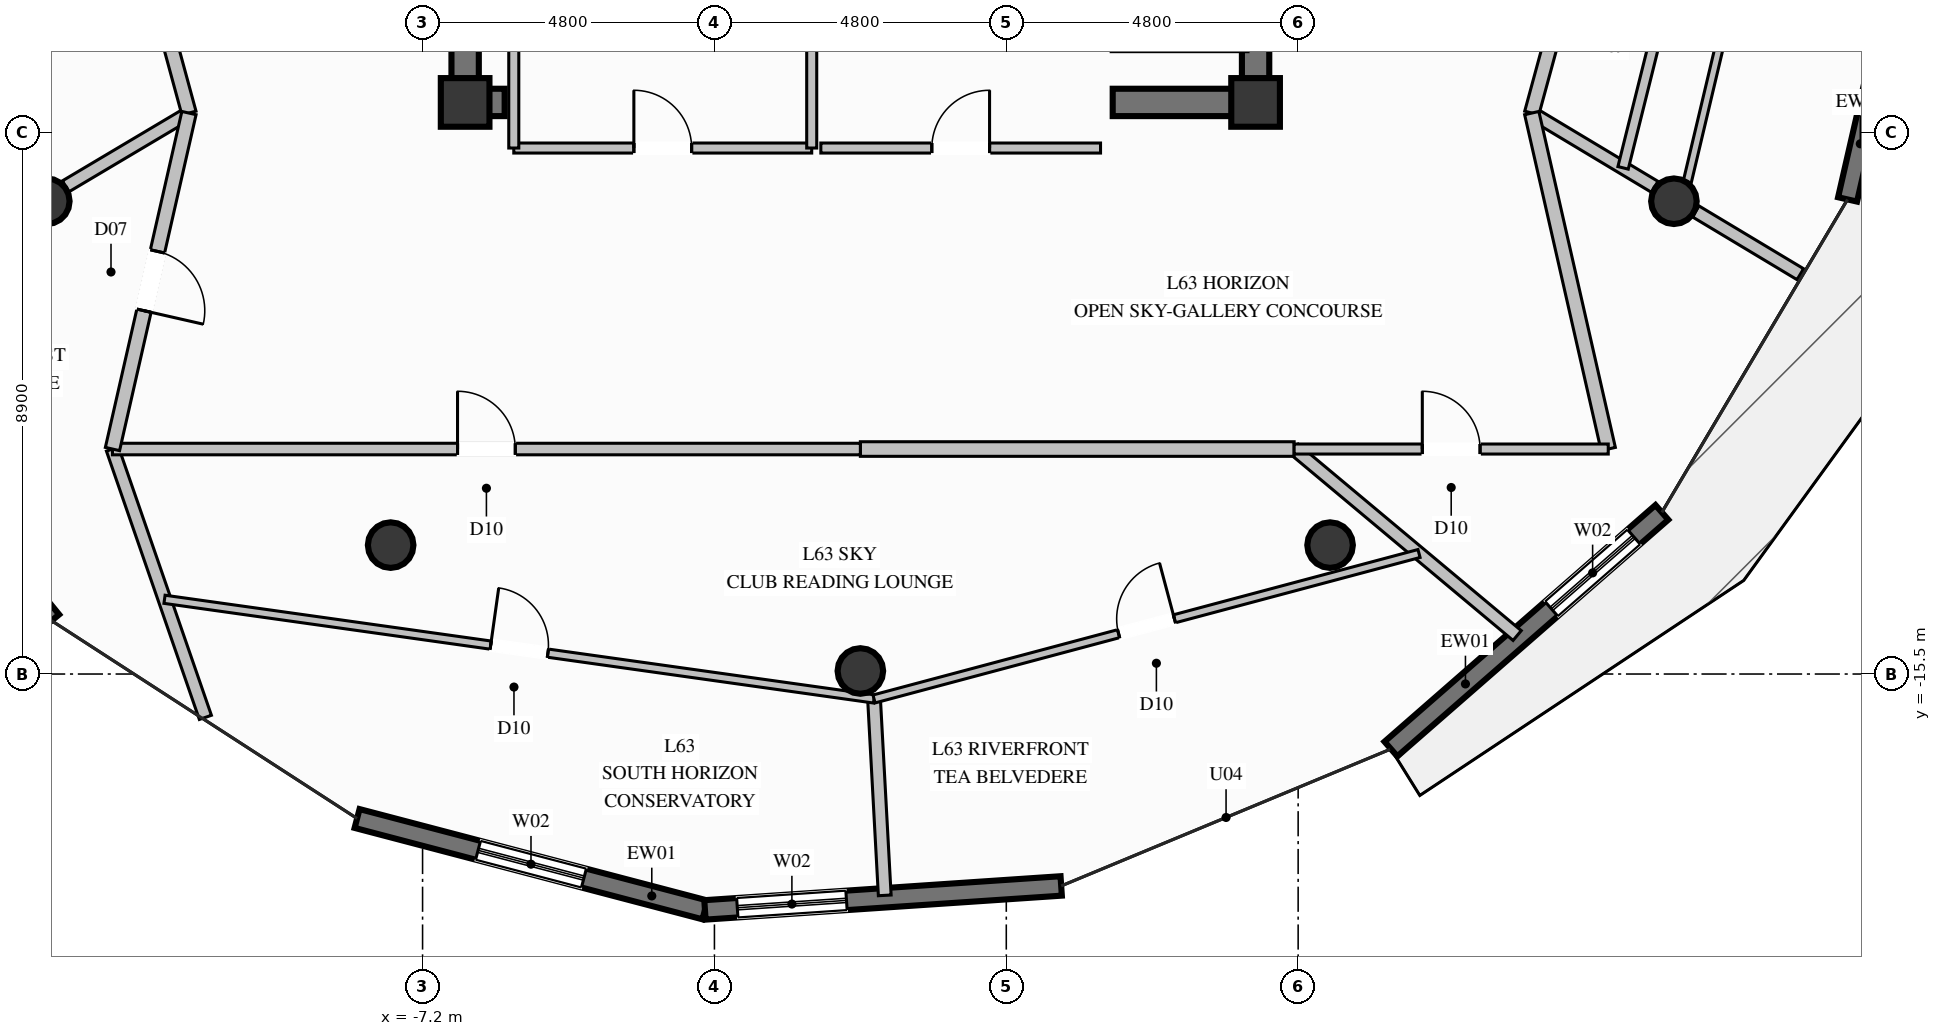
"""IFC4 building model, lengths in metres.
Left out: names, types, materials, properties, quantities, classifications, styles, units other than length and angle.
Written with IfcOpenShell. Run it as: python <this file> out.ifc"""

import sys

from ifc_helpers import new_model, si_unit, direction, frame, frame_2d, origin, origin_2d, place, context, subcontext, project, spatial, rectangle, circle, extrude, element, fill, save


model = new_model("IFC4")
c1 = context("Model", 3, precision=1e-05, world=origin(), true_north=direction((0.0, 1.0)))
c2 = subcontext(c1, "Body", "Model", "MODEL_VIEW")
j1 = project(units=[si_unit("LENGTHUNIT", "METRE"), si_unit("PLANEANGLEUNIT", "RADIAN")], contexts=[c1])
p1 = place(None, origin())
s1 = spatial("IfcSite", under=j1, at=p1, CompositionType="ELEMENT")
p2 = place(p1, origin())
s2 = spatial("IfcBuilding", under=s1, at=p2, CompositionType="ELEMENT")
p3 = place(p2, frame((0.0, 0.0, 243.0)))
s3 = spatial("IfcBuildingStorey", under=s2, at=p3, CompositionType="ELEMENT", Elevation=243.0)
for number, where, z_axis, x_axis in (
    (1, (-6.5, -6.1, 0.0), (0.0, 0.0, 1.0), (1.0, 0.0, 0.0)),
    (2, (6.5, -6.1, 0.0), (0.0, 0.0, 1.0), (1.0, 0.0, 0.0)),
):
    element("IfcColumn", number, at=place(p3, frame(where, z_axis=z_axis, x_axis=x_axis)), inside=s3, PredefinedType="COLUMN", context=c2, shape_type="SweptSolid", body=[
        extrude(rectangle(XDim=0.8, YDim=0.8, at=origin_2d()), origin(), (0.0, 0.0, 1.0), 3.8),
    ])
p4 = place(p3, frame((-6.275, -6.1, 0.0), z_axis=(0.0, 0.0, 1.0), x_axis=(1.0, 0.0, 0.0)))
e3 = element("IfcWall", 3, at=p4, inside=s3, PredefinedType="SHEAR", context=c2, shape_type="SweptSolid", body=[
    extrude(rectangle(XDim=0.425, YDim=0.45, at=frame_2d((0.212, 0.0))), origin(), (0.0, 0.0, 1.0), 3.8),
])
p5 = place(p3, frame((4.15, -6.1, 0.0), z_axis=(0.0, 0.0, 1.0), x_axis=(1.0, 0.0, 0.0)))
e4 = element("IfcWall", 4, at=p5, inside=s3, PredefinedType="SHEAR", context=c2, shape_type="SweptSolid", body=[
    extrude(rectangle(XDim=2.125, YDim=0.45, at=frame_2d((1.062, 0.0))), origin(), (0.0, 0.0, 1.0), 3.8),
])
p6 = place(p3, frame((-6.5, -6.325, 0.0), z_axis=(0.0, 0.0, 1.0), x_axis=(0.0, 1.0, 0.0)))
e5 = element("IfcWall", 5, at=p6, inside=s3, PredefinedType="SHEAR", context=c2, shape_type="SweptSolid", body=[
    extrude(rectangle(XDim=2.975, YDim=0.45, at=frame_2d((1.487, 0.0))), origin(), (0.0, 0.0, 1.0), 3.8),
])
p7 = place(p3, frame((6.5, -6.325, 0.0), z_axis=(0.0, 0.0, 1.0), x_axis=(0.0, 1.0, 0.0)))
e6 = element("IfcWall", 6, at=p7, inside=s3, PredefinedType="SHEAR", context=c2, shape_type="SweptSolid", body=[
    extrude(rectangle(XDim=3.975, YDim=0.45, at=frame_2d((1.987, 0.0))), origin(), (0.0, 0.0, 1.0), 3.8),
])
for number, where, z_axis, x_axis in (
    (7, (-13.38, -7.725, 0.0), (0.0, 0.0, 1.0), (1.0, 0.0, 0.0)),
    (8, (-7.725, -13.38, 0.0), (0.0, 0.0, 1.0), (1.0, 0.0, 0.0)),
    (9, (0.0, -15.45, 0.0), (0.0, 0.0, 1.0), (1.0, 0.0, 0.0)),
    (10, (7.725, -13.38, 0.0), (0.0, 0.0, 1.0), (1.0, 0.0, 0.0)),
    (11, (13.38, -7.725, 0.0), (0.0, 0.0, 1.0), (1.0, 0.0, 0.0)),
):
    element("IfcColumn", number, at=place(p3, frame(where, z_axis=z_axis, x_axis=x_axis)), inside=s3, PredefinedType="COLUMN", context=c2, shape_type="SweptSolid", body=[
        extrude(circle(Radius=0.375, at=origin_2d()), origin(), (0.0, 0.0, 1.0), 3.8),
    ])
p8 = place(p3, frame((13.182, -12.842, 0.0), z_axis=(0.0, 0.0, 1.0), x_axis=(-0.753243589512, -0.657741662706, 0.0)))
e12 = element("IfcWall", 12, at=p8, inside=s3, PredefinedType="SOLIDWALL", context=c2, shape_type="SweptSolid", body=[
    extrude(rectangle(XDim=5.916, YDim=0.32, at=frame_2d((2.958, 0.0))), origin(), (0.0, 0.0, 1.0), 3.57),
])
p9 = place(p8, frame((0.612, 0.0, 0.35)))
e13 = element("IfcOpeningElement", 13, at=p9, cuts=e12, PredefinedType="OPENING", context=c2, shape_type="SweptSolid", body=[
    extrude(rectangle(XDim=1.8, YDim=2.6, at=frame_2d((0.9, 1.3))), frame((0.0, 0.17, 0.0), z_axis=(0.0, -1.0, 0.0), x_axis=(1.0, 0.0, 0.0)), (0.0, 0.0, 1.0), 0.34),
])
p10 = place(p3, frame((17.587, -1.795, 0.0), z_axis=(0.0, 0.0, 1.0), x_axis=(-0.223174159959, -0.974778587335, 0.0)))
e14 = element("IfcWall", 14, at=p10, inside=s3, PredefinedType="SOLIDWALL", context=c2, shape_type="SweptSolid", body=[
    extrude(rectangle(XDim=6.053, YDim=0.32, at=frame_2d((3.026, 0.0))), origin(), (0.0, 0.0, 1.0), 3.57),
])
p11 = place(p10, frame((2.126, 0.0, 0.35)))
e15 = element("IfcOpeningElement", 15, at=p11, cuts=e14, PredefinedType="OPENING", context=c2, shape_type="SweptSolid", body=[
    extrude(rectangle(XDim=1.8, YDim=2.6, at=frame_2d((0.9, 1.3))), frame((0.0, 0.17, 0.0), z_axis=(0.0, -1.0, 0.0), x_axis=(1.0, 0.0, 0.0)), (0.0, 0.0, 1.0), 0.34),
])
p12 = place(p3, frame((-13.301, -14.623, 0.0), z_axis=(0.0, 0.0, 1.0), x_axis=(-0.633391522875, 0.773831492478, 0.0)))
e16 = element("IfcWall", 16, at=p12, inside=s3, PredefinedType="SOLIDWALL", context=c2, shape_type="SweptSolid", body=[
    extrude(rectangle(XDim=6.053, YDim=0.32, at=frame_2d((3.027, 0.0))), origin(), (0.0, 0.0, 1.0), 3.57),
])
p13 = place(p12, frame((2.092, 0.0, 0.35)))
e17 = element("IfcOpeningElement", 17, at=p13, cuts=e16, PredefinedType="OPENING", context=c2, shape_type="SweptSolid", body=[
    extrude(rectangle(XDim=1.8, YDim=2.6, at=frame_2d((0.9, 1.3))), frame((0.0, 0.17, 0.0), z_axis=(0.0, -1.0, 0.0), x_axis=(1.0, 0.0, 0.0)), (0.0, 0.0, 1.0), 0.34),
])
p14 = place(p3, frame((-2.556, -19.379, 0.0), z_axis=(0.0, 0.0, 1.0), x_axis=(-0.96718457854, 0.254074774494, 0.0)))
e18 = element("IfcWall", 18, at=p14, inside=s3, PredefinedType="SOLIDWALL", context=c2, shape_type="SweptSolid", body=[
    extrude(rectangle(XDim=5.915, YDim=0.32, at=frame_2d((2.958, 0.0))), origin(), (0.0, 0.0, 1.0), 3.57),
])
p15 = place(p14, frame((2.058, 0.0, 0.35)))
e19 = element("IfcOpeningElement", 19, at=p15, cuts=e18, PredefinedType="OPENING", context=c2, shape_type="SweptSolid", body=[
    extrude(rectangle(XDim=1.8, YDim=2.6, at=frame_2d((0.9, 1.3))), frame((0.0, 0.17, 0.0), z_axis=(0.0, -1.0, 0.0), x_axis=(1.0, 0.0, 0.0)), (0.0, 0.0, 1.0), 0.34),
])
p16 = place(p3, frame((3.303, -18.985, 0.0), z_axis=(0.0, 0.0, 1.0), x_axis=(-0.997748768453, -0.067062620365, 0.0)))
e20 = element("IfcWall", 20, at=p16, inside=s3, PredefinedType="SOLIDWALL", context=c2, shape_type="SweptSolid", body=[
    extrude(rectangle(XDim=5.872, YDim=0.32, at=frame_2d((2.936, 0.0))), origin(), (0.0, 0.0, 1.0), 3.57),
])
p17 = place(p16, frame((3.539, 0.0, 0.35)))
e21 = element("IfcOpeningElement", 21, at=p17, cuts=e20, PredefinedType="OPENING", context=c2, shape_type="SweptSolid", body=[
    extrude(rectangle(XDim=1.8, YDim=2.6, at=frame_2d((0.9, 1.3))), frame((0.0, 0.17, 0.0), z_axis=(0.0, -1.0, 0.0), x_axis=(1.0, 0.0, 0.0)), (0.0, 0.0, 1.0), 0.34),
])
p18 = place(p3, frame((-5.7, -6.85, 0.0), z_axis=(0.0, 0.0, 1.0), x_axis=(1.0, 0.0, 0.0)))
e22 = element("IfcWall", 22, at=p18, inside=s3, PredefinedType="PARTITIONING", context=c2, shape_type="SweptSolid", body=[
    extrude(rectangle(XDim=4.9, YDim=0.165, at=frame_2d((2.45, 0.0))), origin(), (0.0, 0.0, 1.0), 2.655),
])
p19 = place(p18, frame((1.975, 0.0, 0.0)))
e23 = element("IfcOpeningElement", 23, at=p19, cuts=e22, PredefinedType="OPENING", context=c2, shape_type="SweptSolid", body=[
    extrude(rectangle(XDim=0.95, YDim=2.1, at=frame_2d((0.475, 1.05))), frame((0.0, 0.093, 0.0), z_axis=(0.0, -1.0, 0.0), x_axis=(1.0, 0.0, 0.0)), (0.0, 0.0, 1.0), 0.185),
])
p20 = place(p3, frame((-0.8, -6.85, 0.0), z_axis=(0.0, 0.0, 1.0), x_axis=(0.0, 1.0, 0.0)))
e24 = element("IfcWall", 24, at=p20, inside=s3, PredefinedType="PARTITIONING", context=c2, shape_type="SweptSolid", body=[
    extrude(rectangle(XDim=3.35, YDim=0.165, at=frame_2d((1.675, 0.0))), origin(), (0.0, 0.0, 1.0), 3.57),
])
p21 = place(p3, frame((-5.7, -3.5, 0.0), z_axis=(0.0, 0.0, 1.0), x_axis=(0.0, -1.0, 0.0)))
e25 = element("IfcWall", 25, at=p21, inside=s3, PredefinedType="PARTITIONING", context=c2, shape_type="SweptSolid", body=[
    extrude(rectangle(XDim=3.35, YDim=0.165, at=frame_2d((1.675, 0.0))), origin(), (0.0, 0.0, 1.0), 2.655),
])
p22 = place(p3, frame((-0.65, -6.85, 0.0), z_axis=(0.0, 0.0, 1.0), x_axis=(1.0, 0.0, 0.0)))
e26 = element("IfcWall", 26, at=p22, inside=s3, PredefinedType="PARTITIONING", context=c2, shape_type="SweptSolid", body=[
    extrude(rectangle(XDim=4.6, YDim=0.165, at=frame_2d((2.3, 0.0))), origin(), (0.0, 0.0, 1.0), 2.655),
])
p23 = place(p22, frame((1.825, 0.0, 0.0)))
e27 = element("IfcOpeningElement", 27, at=p23, cuts=e26, PredefinedType="OPENING", context=c2, shape_type="SweptSolid", body=[
    extrude(rectangle(XDim=0.95, YDim=2.1, at=frame_2d((0.475, 1.05))), frame((0.0, 0.093, 0.0), z_axis=(0.0, -1.0, 0.0), x_axis=(1.0, 0.0, 0.0)), (0.0, 0.0, 1.0), 0.185),
])
p24 = place(p3, frame((-11.042, -6.275, 0.0), z_axis=(0.0, 0.0, 1.0), x_axis=(-0.859685751386, -0.510823265781, 0.0)))
e28 = element("IfcWall", 28, at=p24, inside=s3, PredefinedType="PARTITIONING", context=c2, shape_type="SweptSolid", body=[
    extrude(rectangle(XDim=2.359, YDim=0.21, at=frame_2d((1.18, 0.0))), origin(), (0.0, 0.0, 1.0), 3.086),
])
p25 = place(p3, frame((11.042, -6.275, 0.0), z_axis=(0.0, 0.0, 1.0), x_axis=(0.857502061287, -0.514480529164, 0.0)))
e29 = element("IfcWall", 29, at=p25, inside=s3, PredefinedType="PARTITIONING", context=c2, shape_type="SweptSolid", body=[
    extrude(rectangle(XDim=2.358, YDim=0.21, at=frame_2d((1.179, 0.0))), origin(), (0.0, 0.0, 1.0), 3.086),
])
p26 = place(p3, frame((13.738, -7.892, 0.0), z_axis=(0.0, 0.0, 1.0), x_axis=(0.857407053578, -0.514638848587, 0.0)))
e30 = element("IfcWall", 30, at=p26, inside=s3, PredefinedType="PARTITIONING", context=c2, shape_type="SweptSolid", body=[
    extrude(rectangle(XDim=2.007, YDim=0.21, at=frame_2d((1.003, 0.0))), origin(), (0.0, 0.0, 1.0), 3.57),
])
p27 = place(p3, frame((-12.75, 0.0, 0.0), z_axis=(0.0, 0.0, 1.0), x_axis=(0.262640884433, -0.964893655189, 0.0)))
e31 = element("IfcWall", 31, at=p27, inside=s3, PredefinedType="PARTITIONING", context=c2, shape_type="SweptSolid", body=[
    extrude(rectangle(XDim=6.503, YDim=0.24, at=frame_2d((3.251, 0.0))), origin(), (0.0, 0.0, 1.0), 3.57),
])
p28 = place(p3, frame((11.042, -6.275, 0.0), z_axis=(0.0, 0.0, 1.0), x_axis=(0.262572701387, 0.964912211803, 0.0)))
e32 = element("IfcWall", 32, at=p28, inside=s3, PredefinedType="PARTITIONING", context=c2, shape_type="SweptSolid", body=[
    extrude(rectangle(XDim=2.731, YDim=0.24, at=frame_2d((1.365, 0.0))), origin(), (0.0, 0.0, 1.0), 3.57),
])
p29 = place(p3, frame((12.544, -7.176, 0.0), z_axis=(0.0, 0.0, 1.0), x_axis=(0.241851063072, 0.970313384062, 0.0)))
e33 = element("IfcWall", 33, at=p29, inside=s3, PredefinedType="PLUMBINGWALL", context=c2, shape_type="SweptSolid", body=[
    extrude(rectangle(XDim=3.105, YDim=0.175, at=frame_2d((1.553, 0.0))), origin(), (0.0, 0.0, 1.0), 3.57),
])
p30 = place(p3, frame((13.516, -7.759, 0.0), z_axis=(0.0, 0.0, 1.0), x_axis=(0.230840940032, 0.972991500685, 0.0)))
e34 = element("IfcWall", 34, at=p30, inside=s3, PredefinedType="PARTITIONING", context=c2, shape_type="SweptSolid", body=[
    extrude(rectangle(XDim=7.974, YDim=0.135, at=frame_2d((3.987, 0.0))), origin(), (0.0, 0.0, 1.0), 3.139),
])
p31 = place(p30, frame((3.512, 0.0, 0.0)))
e35 = element("IfcOpeningElement", 35, at=p31, cuts=e34, PredefinedType="OPENING", context=c2, shape_type="SweptSolid", body=[
    extrude(rectangle(XDim=0.95, YDim=2.1, at=frame_2d((0.475, 1.05))), frame((0.0, 0.078, 0.0), z_axis=(0.0, -1.0, 0.0), x_axis=(1.0, 0.0, 0.0)), (0.0, 0.0, 1.0), 0.155),
])
p32 = place(p3, frame((7.134, -11.8, 0.0), z_axis=(0.0, 0.0, 1.0), x_axis=(0.767165499913, -0.641449215249, 0.0)))
e36 = element("IfcWall", 36, at=p32, inside=s3, PredefinedType="PARTITIONING", context=c2, shape_type="SweptSolid", body=[
    extrude(rectangle(XDim=4.781, YDim=0.21, at=frame_2d((2.391, 0.0))), origin(), (0.0, 0.0, 1.0), 3.57),
])
p33 = place(p3, frame((-12.3, -11.8, 0.0), z_axis=(0.0, 0.0, 1.0), x_axis=(0.327216501768, -0.944949395984, 0.0)))
e37 = element("IfcWall", 37, at=p33, inside=s3, PredefinedType="PARTITIONING", context=c2, shape_type="SweptSolid", body=[
    extrude(rectangle(XDim=4.67, YDim=0.21, at=frame_2d((2.335, 0.0))), origin(), (0.0, 0.0, 1.0), 3.57),
])
p34 = place(p3, frame((0.0, -11.8, 0.0), z_axis=(0.0, 0.0, 1.0), x_axis=(1.0, 0.0, 0.0)))
e38 = element("IfcWall", 38, at=p34, inside=s3, PredefinedType="PARTITIONING", context=c2, shape_type="SweptSolid", body=[
    extrude(rectangle(XDim=7.134, YDim=0.24, at=frame_2d((3.567, 0.0))), origin(), (0.0, 0.0, 1.0), 3.57),
])
p35 = place(p3, frame((-12.3, -11.8, 0.0), z_axis=(0.0, 0.0, 1.0), x_axis=(1.0, 0.0, 0.0)))
e39 = element("IfcWall", 39, at=p35, inside=s3, PredefinedType="PARTITIONING", context=c2, shape_type="SweptSolid", body=[
    extrude(rectangle(XDim=12.3, YDim=0.19, at=frame_2d((6.15, 0.0))), origin(), (0.0, 0.0, 1.0), 3.57),
])
p36 = place(p35, frame((5.675, 0.0, 0.0)))
e40 = element("IfcOpeningElement", 40, at=p36, cuts=e39, PredefinedType="OPENING", context=c2, shape_type="SweptSolid", body=[
    extrude(rectangle(XDim=0.95, YDim=2.1, at=frame_2d((0.475, 1.05))), frame((0.0, 0.105, 0.0), z_axis=(0.0, -1.0, 0.0), x_axis=(1.0, 0.0, 0.0)), (0.0, 0.0, 1.0), 0.21),
])
p37 = place(p3, frame((-11.042, -6.275, 0.0), z_axis=(0.0, 0.0, 1.0), x_axis=(-0.222014008723, -0.975043475918, 0.0)))
e41 = element("IfcWall", 41, at=p37, inside=s3, PredefinedType="PARTITIONING", context=c2, shape_type="SweptSolid", body=[
    extrude(rectangle(XDim=5.667, YDim=0.24, at=frame_2d((2.833, 0.0))), origin(), (0.0, 0.0, 1.0), 3.57),
])
p38 = place(p37, frame((2.333, 0.0, 0.0)))
e42 = element("IfcOpeningElement", 42, at=p38, cuts=e41, PredefinedType="OPENING", context=c2, shape_type="SweptSolid", body=[
    extrude(rectangle(XDim=1.0, YDim=2.2, at=frame_2d((0.5, 1.1))), frame((0.0, 0.13, 0.0), z_axis=(0.0, -1.0, 0.0), x_axis=(1.0, 0.0, 0.0)), (0.0, 0.0, 1.0), 0.26),
])
p39 = place(p3, frame((0.225, -15.91, 0.0), z_axis=(0.0, 0.0, 1.0), x_axis=(0.054341356021, -0.998522416887, 0.0)))
e43 = element("IfcWall", 43, at=p39, inside=s3, PredefinedType="PARTITIONING", context=c2, shape_type="SweptSolid", body=[
    extrude(rectangle(XDim=3.235, YDim=0.21, at=frame_2d((1.617, 0.0))), origin(), (0.0, 0.0, 1.0), 3.57),
])
p40 = place(p3, frame((-11.444, -14.271, 0.0), z_axis=(0.0, 0.0, 1.0), x_axis=(0.990280714827, -0.139083089705, 0.0)))
e44 = element("IfcWall", 44, at=p40, inside=s3, PredefinedType="PARTITIONING", context=c2, shape_type="SweptSolid", body=[
    extrude(rectangle(XDim=11.784, YDim=0.135, at=frame_2d((5.892, 0.0))), origin(), (0.0, 0.0, 1.0), 3.139),
])
p41 = place(p40, frame((5.417, 0.0, 0.0)))
e45 = element("IfcOpeningElement", 45, at=p41, cuts=e44, PredefinedType="OPENING", context=c2, shape_type="SweptSolid", body=[
    extrude(rectangle(XDim=0.95, YDim=2.1, at=frame_2d((0.475, 1.05))), frame((0.0, 0.078, 0.0), z_axis=(0.0, -1.0, 0.0), x_axis=(1.0, 0.0, 0.0)), (0.0, 0.0, 1.0), 0.155),
])
p42 = place(p3, frame((0.225, -15.91, 0.0), z_axis=(0.0, 0.0, 1.0), x_axis=(0.966188184598, 0.25783791797, 0.0)))
e46 = element("IfcWall", 46, at=p42, inside=s3, PredefinedType="PARTITIONING", context=c2, shape_type="SweptSolid", body=[
    extrude(rectangle(XDim=9.277, YDim=0.135, at=frame_2d((4.638, 0.0))), origin(), (0.0, 0.0, 1.0), 3.139),
])
p43 = place(p42, frame((4.163, 0.0, 0.0)))
e47 = element("IfcOpeningElement", 47, at=p43, cuts=e46, PredefinedType="OPENING", context=c2, shape_type="SweptSolid", body=[
    extrude(rectangle(XDim=0.95, YDim=2.1, at=frame_2d((0.475, 1.05))), frame((0.0, 0.078, 0.0), z_axis=(0.0, -1.0, 0.0), x_axis=(1.0, 0.0, 0.0)), (0.0, 0.0, 1.0), 0.155),
])
p44 = place(p3, frame((12.3, -11.8, 0.0), z_axis=(0.0, 0.0, 1.0), x_axis=(-0.222014008723, 0.975043475918, 0.0)))
e48 = element("IfcWall", 48, at=p44, inside=s3, PredefinedType="PARTITIONING", context=c2, shape_type="SweptSolid", body=[
    extrude(rectangle(XDim=5.667, YDim=0.24, at=frame_2d((2.833, 0.0))), origin(), (0.0, 0.0, 1.0), 3.57),
])
p45 = place(p3, frame((7.134, -11.8, 0.0), z_axis=(0.0, 0.0, 1.0), x_axis=(1.0, 0.0, 0.0)))
e49 = element("IfcWall", 49, at=p45, inside=s3, PredefinedType="PARTITIONING", context=c2, shape_type="SweptSolid", body=[
    extrude(rectangle(XDim=5.166, YDim=0.165, at=frame_2d((2.583, 0.0))), origin(), (0.0, 0.0, 1.0), 3.57),
])
p46 = place(p45, frame((2.108, 0.0, 0.0)))
e50 = element("IfcOpeningElement", 50, at=p46, cuts=e49, PredefinedType="OPENING", context=c2, shape_type="SweptSolid", body=[
    extrude(rectangle(XDim=0.95, YDim=2.1, at=frame_2d((0.475, 1.05))), frame((0.0, 0.093, 0.0), z_axis=(0.0, -1.0, 0.0), x_axis=(1.0, 0.0, 0.0)), (0.0, 0.0, 1.0), 0.185),
])
p47 = place(p9, origin())
e51 = element("IfcWindow", 51, at=p47, inside=s3, PartitioningType="SINGLE_PANEL", PredefinedType="WINDOW", context=c2, shape_type="SweptSolid", body=[
    extrude(rectangle(XDim=1.8, YDim=2.6, at=frame_2d((0.9, 1.3))), frame((0.0, 0.03, 0.0), z_axis=(0.0, -1.0, 0.0), x_axis=(1.0, 0.0, 0.0)), (0.0, 0.0, 1.0), 0.06),
])
fill(e13, e51)
p48 = place(p15, origin())
e52 = element("IfcWindow", 52, at=p48, inside=s3, PartitioningType="SINGLE_PANEL", PredefinedType="WINDOW", context=c2, shape_type="SweptSolid", body=[
    extrude(rectangle(XDim=1.8, YDim=2.6, at=frame_2d((0.9, 1.3))), frame((0.0, 0.03, 0.0), z_axis=(0.0, -1.0, 0.0), x_axis=(1.0, 0.0, 0.0)), (0.0, 0.0, 1.0), 0.06),
])
fill(e19, e52)
p49 = place(p17, origin())
e53 = element("IfcWindow", 53, at=p49, inside=s3, PartitioningType="SINGLE_PANEL", PredefinedType="WINDOW", context=c2, shape_type="SweptSolid", body=[
    extrude(rectangle(XDim=1.8, YDim=2.6, at=frame_2d((0.9, 1.3))), frame((0.0, 0.03, 0.0), z_axis=(0.0, -1.0, 0.0), x_axis=(1.0, 0.0, 0.0)), (0.0, 0.0, 1.0), 0.06),
])
fill(e21, e53)
p50 = place(p19, origin())
e54 = element("IfcDoor", 54, at=p50, inside=s3, OperationType="SINGLE_SWING_LEFT", PredefinedType="DOOR", context=c2, shape_type="SweptSolid", body=[
    extrude(rectangle(XDim=0.95, YDim=2.1, at=frame_2d((0.475, 1.05))), frame((0.0, 0.025, 0.0), z_axis=(0.0, -1.0, 0.0), x_axis=(1.0, 0.0, 0.0)), (0.0, 0.0, 1.0), 0.05),
])
fill(e23, e54)
p51 = place(p23, origin())
e55 = element("IfcDoor", 55, at=p51, inside=s3, OperationType="SINGLE_SWING_RIGHT", PredefinedType="DOOR", context=c2, shape_type="SweptSolid", body=[
    extrude(rectangle(XDim=0.95, YDim=2.1, at=frame_2d((0.475, 1.05))), frame((0.0, 0.025, 0.0), z_axis=(0.0, -1.0, 0.0), x_axis=(1.0, 0.0, 0.0)), (0.0, 0.0, 1.0), 0.05),
])
fill(e27, e55)
p52 = place(p36, origin())
e56 = element("IfcDoor", 56, at=p52, inside=s3, OperationType="SINGLE_SWING_LEFT", PredefinedType="DOOR", context=c2, shape_type="SweptSolid", body=[
    extrude(rectangle(XDim=0.95, YDim=2.1, at=frame_2d((0.475, 1.05))), frame((0.0, 0.025, 0.0), z_axis=(0.0, -1.0, 0.0), x_axis=(1.0, 0.0, 0.0)), (0.0, 0.0, 1.0), 0.05),
])
fill(e40, e56)
p53 = place(p38, origin())
e57 = element("IfcDoor", 57, at=p53, inside=s3, OperationType="SINGLE_SWING_RIGHT", PredefinedType="DOOR", context=c2, shape_type="SweptSolid", body=[
    extrude(rectangle(XDim=1.0, YDim=2.2, at=frame_2d((0.5, 1.1))), frame((0.0, 0.025, 0.0), z_axis=(0.0, -1.0, 0.0), x_axis=(1.0, 0.0, 0.0)), (0.0, 0.0, 1.0), 0.05),
])
fill(e42, e57)
p54 = place(p41, origin())
e58 = element("IfcDoor", 58, at=p54, inside=s3, OperationType="SINGLE_SWING_LEFT", PredefinedType="DOOR", context=c2, shape_type="SweptSolid", body=[
    extrude(rectangle(XDim=0.95, YDim=2.1, at=frame_2d((0.475, 1.05))), frame((0.0, 0.025, 0.0), z_axis=(0.0, -1.0, 0.0), x_axis=(1.0, 0.0, 0.0)), (0.0, 0.0, 1.0), 0.05),
])
fill(e45, e58)
p55 = place(p43, origin())
e59 = element("IfcDoor", 59, at=p55, inside=s3, OperationType="SINGLE_SWING_RIGHT", PredefinedType="DOOR", context=c2, shape_type="SweptSolid", body=[
    extrude(rectangle(XDim=0.95, YDim=2.1, at=frame_2d((0.475, 1.05))), frame((0.0, 0.025, 0.0), z_axis=(0.0, -1.0, 0.0), x_axis=(1.0, 0.0, 0.0)), (0.0, 0.0, 1.0), 0.05),
])
fill(e47, e59)
p56 = place(p46, origin())
e60 = element("IfcDoor", 60, at=p56, inside=s3, OperationType="SINGLE_SWING_LEFT", PredefinedType="DOOR", context=c2, shape_type="SweptSolid", body=[
    extrude(rectangle(XDim=0.95, YDim=2.1, at=frame_2d((0.475, 1.05))), frame((0.0, 0.025, 0.0), z_axis=(0.0, -1.0, 0.0), x_axis=(1.0, 0.0, 0.0)), (0.0, 0.0, 1.0), 0.05),
])
fill(e50, e60)
save(model, sys.argv[1])
